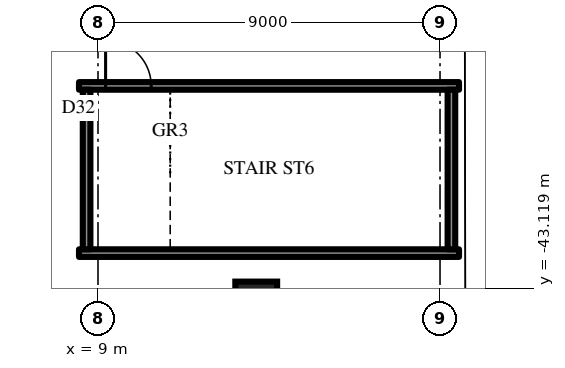
"""IFC4 building model, lengths in metres.
Left out: names, types, materials, properties, quantities, classifications, styles, units other than length and angle.
Written with IfcOpenShell. Run it as: python <this file> out.ifc"""

import sys

from ifc_helpers import new_model, si_unit, direction, frame, frame_2d, origin, origin_2d, place, context, subcontext, project, spatial, rectangle, extrude, element, fill, save


model = new_model("IFC4")
c1 = context("Model", 3, precision=1e-05, world=origin(), true_north=direction((0.0, 1.0)))
c2 = subcontext(c1, "Body", "Model", "MODEL_VIEW")
j1 = project(units=[si_unit("LENGTHUNIT", "METRE"), si_unit("PLANEANGLEUNIT", "RADIAN")], contexts=[c1])
p1 = place(None, origin())
s1 = spatial("IfcSite", under=j1, at=p1, CompositionType="ELEMENT")
p2 = place(p1, origin())
s2 = spatial("IfcBuilding", under=s1, at=p2, CompositionType="ELEMENT")
p3 = place(p2, frame((0.0, 0.0, 18.5)))
s3 = spatial("IfcBuildingStorey", under=s2, at=p3, CompositionType="ELEMENT", Elevation=18.5)
p4 = place(p3, frame((8.5, -42.2, 0.0), z_axis=(0.0, 0.0, 1.0), x_axis=(1.0, 0.0, 0.0)))
e1 = element("IfcWall", 1, at=p4, inside=s3, PredefinedType="SHEAR", context=c2, shape_type="SweptSolid", body=[
    extrude(rectangle(XDim=10.0, YDim=0.2, at=frame_2d((5.0, 0.0))), origin(), (0.0, 0.0, 1.0), 5.0),
])
p5 = place(p3, frame((18.5, -37.8, 0.0), z_axis=(0.0, 0.0, 1.0), x_axis=(-1.0, 0.0, 0.0)))
e2 = element("IfcWall", 2, at=p5, inside=s3, PredefinedType="SHEAR", context=c2, shape_type="SweptSolid", body=[
    extrude(rectangle(XDim=10.0, YDim=0.2, at=frame_2d((5.0, 0.0))), origin(), (0.0, 0.0, 1.0), 5.0),
])
p6 = place(p5, frame((8.1, 0.0, 0.0)))
e3 = element("IfcOpeningElement", 3, at=p6, cuts=e2, PredefinedType="OPENING", context=c2, shape_type="SweptSolid", body=[
    extrude(rectangle(XDim=1.2, YDim=2.2, at=frame_2d((0.6, 1.1))), frame((0.0, 0.11, 0.0), z_axis=(0.0, -1.0, 0.0), x_axis=(1.0, 0.0, 0.0)), (0.0, 0.0, 1.0), 0.22),
])
for number, where, z_axis, x_axis in (
    (4, (8.7, -37.9, 0.0), (0.0, 0.0, 1.0), (0.0, -1.0, 0.0)),
    (5, (18.3, -42.1, 0.0), (0.0, 0.0, 1.0), (0.0, 1.0, 0.0)),
):
    element("IfcWall", number, at=place(p3, frame(where, z_axis=z_axis, x_axis=x_axis)), inside=s3, PredefinedType="SHEAR", context=c2, shape_type="SweptSolid", body=[
        extrude(rectangle(XDim=4.2, YDim=0.2, at=frame_2d((2.1, 0.0))), origin(), (0.0, 0.0, 1.0), 5.0),
    ])
p7 = place(p3, frame((13.164, -43.5, 0.0), z_axis=(0.0, 0.0, 1.0), x_axis=(1.0, 0.0, 0.0)))
e6 = element("IfcColumn", 6, at=p7, inside=s3, PredefinedType="COLUMN", context=c2, shape_type="SweptSolid", body=[
    extrude(rectangle(XDim=1.1, YDim=1.1, at=origin_2d()), origin(), (0.0, 0.0, 1.0), 5.0),
])
p8 = place(p6, frame((1.2, 0.0, 0.0), z_axis=(0.0, 0.0, 1.0), x_axis=(-1.0, 0.0, 0.0)))
e7 = element("IfcDoor", 7, at=p8, inside=s3, OperationType="SINGLE_SWING_RIGHT", PredefinedType="DOOR", context=c2, shape_type="SweptSolid", body=[
    extrude(rectangle(XDim=1.2, YDim=2.2, at=frame_2d((0.6, 1.1))), frame((0.0, 0.025, 0.0), z_axis=(0.0, -1.0, 0.0), x_axis=(1.0, 0.0, 0.0)), (0.0, 0.0, 1.0), 0.05),
])
fill(e3, e7)
save(model, sys.argv[1])
